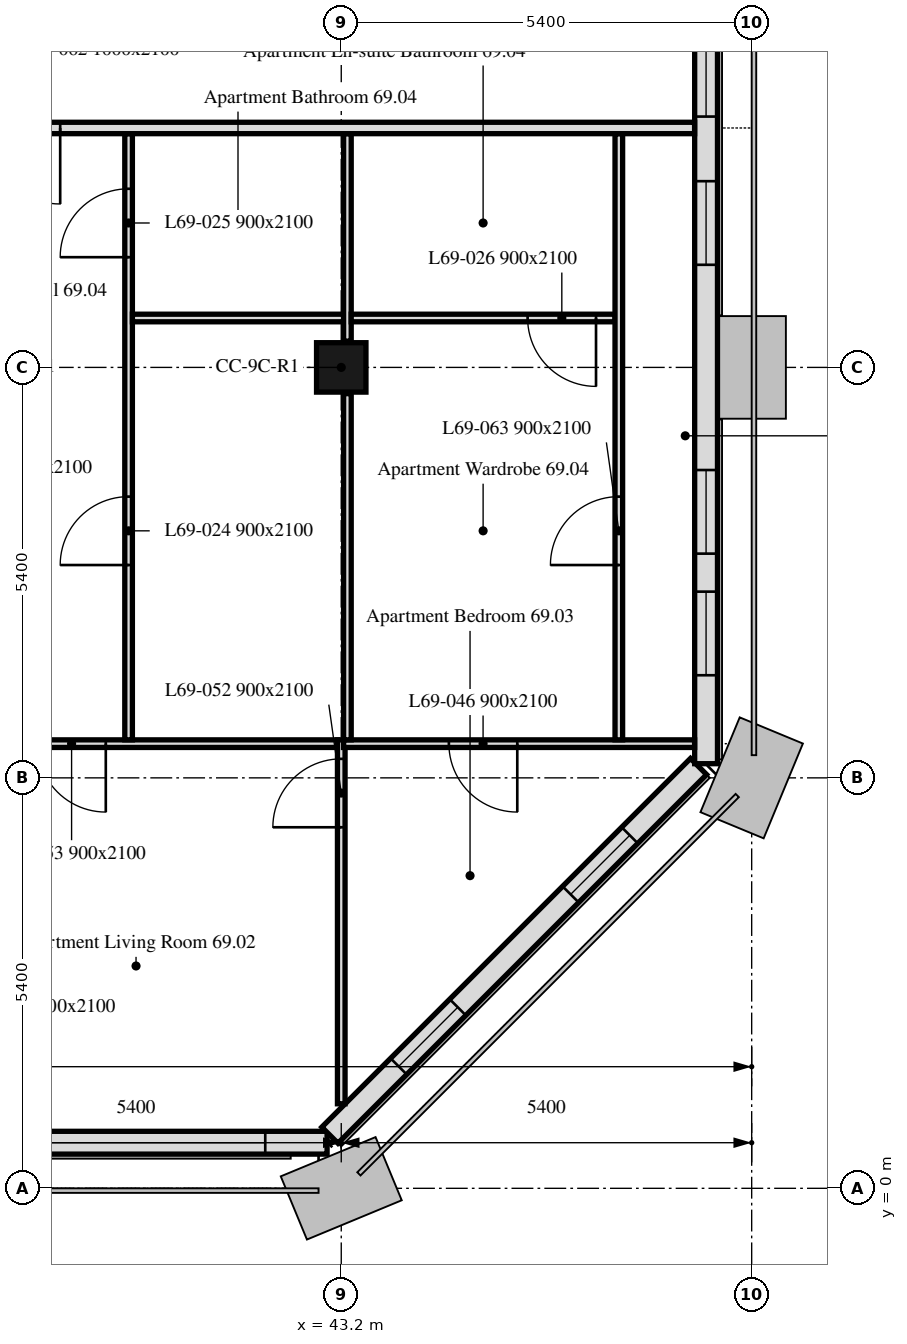
"""IFC4 building model, lengths in metres.
Left out: names, types, materials, properties, quantities, classifications, styles, units other than length and angle.
Written with IfcOpenShell. Run it as: python <this file> out.ifc"""

import sys

from ifc_helpers import new_model, si_unit, direction, frame, frame_2d, origin, origin_2d, place, context, subcontext, project, spatial, rectangle, extrude, element, fill, save


model = new_model("IFC4")
c1 = context("Model", 3, precision=1e-05, world=origin(), true_north=direction((0.0, 1.0)))
c2 = subcontext(c1, "Body", "Model", "MODEL_VIEW")
j1 = project(units=[si_unit("LENGTHUNIT", "METRE"), si_unit("PLANEANGLEUNIT", "RADIAN")], contexts=[c1])
p1 = place(None, origin())
s1 = spatial("IfcSite", under=j1, at=p1, CompositionType="ELEMENT")
p2 = place(p1, origin())
s2 = spatial("IfcBuilding", under=s1, at=p2, CompositionType="ELEMENT")
p3 = place(p2, frame((0.0, 0.0, 281.8)))
s3 = spatial("IfcBuildingStorey", under=s2, at=p3, CompositionType="ELEMENT", Elevation=281.8)
p4 = place(p3, frame((43.2, 10.8, 0.0), z_axis=(0.0, 0.0, 1.0), x_axis=(1.0, 0.0, 0.0)))
e1 = element("IfcColumn", 1, at=p4, inside=s3, PredefinedType="COLUMN", context=c2, shape_type="SweptSolid", body=[
    extrude(rectangle(XDim=0.65, YDim=0.65, at=origin_2d()), origin(), (0.0, 0.0, 1.0), 3.0),
])
p5 = place(p3, frame((10.986, 0.6, 0.0), z_axis=(0.0, 0.0, 1.0), x_axis=(1.0, 0.0, 0.0)))
e2 = element("IfcWall", 2, at=p5, inside=s3, PredefinedType="SOLIDWALL", context=c2, shape_type="SweptSolid", body=[
    extrude(rectangle(XDim=32.027, YDim=0.3, at=frame_2d((16.014, 0.0))), origin(), (0.0, 0.0, 1.0), 3.0),
])
p6 = place(p5, frame((2.764, 0.0, 0.9)))
e3 = element("IfcOpeningElement", 3, at=p6, cuts=e2, PredefinedType="OPENING", context=c2, shape_type="SweptSolid", body=[
    extrude(rectangle(XDim=1.1, YDim=1.7, at=frame_2d((0.55, 0.85))), frame((0.0, 0.16, 0.0), z_axis=(0.0, -1.0, 0.0), x_axis=(1.0, 0.0, 0.0)), (0.0, 0.0, 1.0), 0.32),
])
p7 = place(p5, frame((6.214, 0.0, 0.9)))
e4 = element("IfcOpeningElement", 4, at=p7, cuts=e2, PredefinedType="OPENING", context=c2, shape_type="SweptSolid", body=[
    extrude(rectangle(XDim=3.4, YDim=1.7, at=frame_2d((1.7, 0.85))), frame((0.0, 0.16, 0.0), z_axis=(0.0, -1.0, 0.0), x_axis=(1.0, 0.0, 0.0)), (0.0, 0.0, 1.0), 0.32),
])
p8 = place(p5, frame((13.564, 0.0, 0.9)))
e5 = element("IfcOpeningElement", 5, at=p8, cuts=e2, PredefinedType="OPENING", context=c2, shape_type="SweptSolid", body=[
    extrude(rectangle(XDim=1.1, YDim=1.7, at=frame_2d((0.55, 0.85))), frame((0.0, 0.16, 0.0), z_axis=(0.0, -1.0, 0.0), x_axis=(1.0, 0.0, 0.0)), (0.0, 0.0, 1.0), 0.32),
])
p9 = place(p5, frame((17.014, 0.0, 0.9)))
e6 = element("IfcOpeningElement", 6, at=p9, cuts=e2, PredefinedType="OPENING", context=c2, shape_type="SweptSolid", body=[
    extrude(rectangle(XDim=3.4, YDim=1.7, at=frame_2d((1.7, 0.85))), frame((0.0, 0.16, 0.0), z_axis=(0.0, -1.0, 0.0), x_axis=(1.0, 0.0, 0.0)), (0.0, 0.0, 1.0), 0.32),
])
p10 = place(p5, frame((24.364, 0.0, 0.9)))
e7 = element("IfcOpeningElement", 7, at=p10, cuts=e2, PredefinedType="OPENING", context=c2, shape_type="SweptSolid", body=[
    extrude(rectangle(XDim=1.1, YDim=1.7, at=frame_2d((0.55, 0.85))), frame((0.0, 0.16, 0.0), z_axis=(0.0, -1.0, 0.0), x_axis=(1.0, 0.0, 0.0)), (0.0, 0.0, 1.0), 0.32),
])
p11 = place(p5, frame((27.814, 0.0, 0.9)))
e8 = element("IfcOpeningElement", 8, at=p11, cuts=e2, PredefinedType="OPENING", context=c2, shape_type="SweptSolid", body=[
    extrude(rectangle(XDim=3.4, YDim=1.7, at=frame_2d((1.7, 0.85))), frame((0.0, 0.16, 0.0), z_axis=(0.0, -1.0, 0.0), x_axis=(1.0, 0.0, 0.0)), (0.0, 0.0, 1.0), 0.32),
])
p12 = place(p3, frame((43.051, 0.699, 0.0), z_axis=(0.0, 0.0, 1.0), x_axis=(0.707106781187, 0.707106781187, 0.0)))
e9 = element("IfcWall", 9, at=p12, inside=s3, PredefinedType="SOLIDWALL", context=c2, shape_type="SweptSolid", body=[
    extrude(rectangle(XDim=6.86, YDim=0.3, at=frame_2d((3.43, 0.0))), origin(), (0.0, 0.0, 1.0), 3.0),
])
p13 = place(p12, frame((1.28, 0.0, 0.9)))
e10 = element("IfcOpeningElement", 10, at=p13, cuts=e9, PredefinedType="OPENING", context=c2, shape_type="SweptSolid", body=[
    extrude(rectangle(XDim=1.1, YDim=1.7, at=frame_2d((0.55, 0.85))), frame((0.0, 0.16, 0.0), z_axis=(0.0, -1.0, 0.0), x_axis=(1.0, 0.0, 0.0)), (0.0, 0.0, 1.0), 0.32),
])
p14 = place(p12, frame((4.48, 0.0, 0.9)))
e11 = element("IfcOpeningElement", 11, at=p14, cuts=e9, PredefinedType="OPENING", context=c2, shape_type="SweptSolid", body=[
    extrude(rectangle(XDim=1.1, YDim=1.7, at=frame_2d((0.55, 0.85))), frame((0.0, 0.16, 0.0), z_axis=(0.0, -1.0, 0.0), x_axis=(1.0, 0.0, 0.0)), (0.0, 0.0, 1.0), 0.32),
])
p15 = place(p3, frame((48.0, 5.586, 0.0), z_axis=(0.0, 0.0, 1.0), x_axis=(0.0, 1.0, 0.0)))
e12 = element("IfcWall", 12, at=p15, inside=s3, PredefinedType="SOLIDWALL", context=c2, shape_type="SweptSolid", body=[
    extrude(rectangle(XDim=32.027, YDim=0.3, at=frame_2d((16.014, 0.0))), origin(), (0.0, 0.0, 1.0), 3.0),
])
p16 = place(p15, frame((1.164, 0.0, 0.9)))
e13 = element("IfcOpeningElement", 13, at=p16, cuts=e12, PredefinedType="OPENING", context=c2, shape_type="SweptSolid", body=[
    extrude(rectangle(XDim=1.1, YDim=1.7, at=frame_2d((0.55, 0.85))), frame((0.0, 0.16, 0.0), z_axis=(0.0, -1.0, 0.0), x_axis=(1.0, 0.0, 0.0)), (0.0, 0.0, 1.0), 0.32),
])
p17 = place(p15, frame((2.764, 0.0, 0.9)))
e14 = element("IfcOpeningElement", 14, at=p17, cuts=e12, PredefinedType="OPENING", context=c2, shape_type="SweptSolid", body=[
    extrude(rectangle(XDim=1.1, YDim=1.7, at=frame_2d((0.55, 0.85))), frame((0.0, 0.16, 0.0), z_axis=(0.0, -1.0, 0.0), x_axis=(1.0, 0.0, 0.0)), (0.0, 0.0, 1.0), 0.32),
])
p18 = place(p15, frame((6.564, 0.0, 0.9)))
e15 = element("IfcOpeningElement", 15, at=p18, cuts=e12, PredefinedType="OPENING", context=c2, shape_type="SweptSolid", body=[
    extrude(rectangle(XDim=1.1, YDim=1.7, at=frame_2d((0.55, 0.85))), frame((0.0, 0.16, 0.0), z_axis=(0.0, -1.0, 0.0), x_axis=(1.0, 0.0, 0.0)), (0.0, 0.0, 1.0), 0.32),
])
p19 = place(p15, frame((8.514, 0.0, 0.9)))
e16 = element("IfcOpeningElement", 16, at=p19, cuts=e12, PredefinedType="OPENING", context=c2, shape_type="SweptSolid", body=[
    extrude(rectangle(XDim=1.1, YDim=1.7, at=frame_2d((0.55, 0.85))), frame((0.0, 0.16, 0.0), z_axis=(0.0, -1.0, 0.0), x_axis=(1.0, 0.0, 0.0)), (0.0, 0.0, 1.0), 0.32),
])
p20 = place(p15, frame((11.964, 0.0, 0.9)))
e17 = element("IfcOpeningElement", 17, at=p20, cuts=e12, PredefinedType="OPENING", context=c2, shape_type="SweptSolid", body=[
    extrude(rectangle(XDim=1.1, YDim=1.7, at=frame_2d((0.55, 0.85))), frame((0.0, 0.16, 0.0), z_axis=(0.0, -1.0, 0.0), x_axis=(1.0, 0.0, 0.0)), (0.0, 0.0, 1.0), 0.32),
])
p21 = place(p15, frame((13.564, 0.0, 0.9)))
e18 = element("IfcOpeningElement", 18, at=p21, cuts=e12, PredefinedType="OPENING", context=c2, shape_type="SweptSolid", body=[
    extrude(rectangle(XDim=1.1, YDim=1.7, at=frame_2d((0.55, 0.85))), frame((0.0, 0.16, 0.0), z_axis=(0.0, -1.0, 0.0), x_axis=(1.0, 0.0, 0.0)), (0.0, 0.0, 1.0), 0.32),
])
p22 = place(p15, frame((17.014, 0.0, 0.9)))
e19 = element("IfcOpeningElement", 19, at=p22, cuts=e12, PredefinedType="OPENING", context=c2, shape_type="SweptSolid", body=[
    extrude(rectangle(XDim=3.4, YDim=1.7, at=frame_2d((1.7, 0.85))), frame((0.0, 0.16, 0.0), z_axis=(0.0, -1.0, 0.0), x_axis=(1.0, 0.0, 0.0)), (0.0, 0.0, 1.0), 0.32),
])
p23 = place(p15, frame((22.764, 0.0, 0.9)))
e20 = element("IfcOpeningElement", 20, at=p23, cuts=e12, PredefinedType="OPENING", context=c2, shape_type="SweptSolid", body=[
    extrude(rectangle(XDim=1.1, YDim=1.7, at=frame_2d((0.55, 0.85))), frame((0.0, 0.16, 0.0), z_axis=(0.0, -1.0, 0.0), x_axis=(1.0, 0.0, 0.0)), (0.0, 0.0, 1.0), 0.32),
])
p24 = place(p15, frame((24.364, 0.0, 0.9)))
e21 = element("IfcOpeningElement", 21, at=p24, cuts=e12, PredefinedType="OPENING", context=c2, shape_type="SweptSolid", body=[
    extrude(rectangle(XDim=1.1, YDim=1.7, at=frame_2d((0.55, 0.85))), frame((0.0, 0.16, 0.0), z_axis=(0.0, -1.0, 0.0), x_axis=(1.0, 0.0, 0.0)), (0.0, 0.0, 1.0), 0.32),
])
p25 = place(p15, frame((28.239, 0.0, 0.9)))
e22 = element("IfcOpeningElement", 22, at=p25, cuts=e12, PredefinedType="OPENING", context=c2, shape_type="SweptSolid", body=[
    extrude(rectangle(XDim=0.65, YDim=1.7, at=frame_2d((0.325, 0.85))), frame((0.0, 0.16, 0.0), z_axis=(0.0, -1.0, 0.0), x_axis=(1.0, 0.0, 0.0)), (0.0, 0.0, 1.0), 0.32),
])
p26 = place(p15, frame((29.764, 0.0, 0.9)))
e23 = element("IfcOpeningElement", 23, at=p26, cuts=e12, PredefinedType="OPENING", context=c2, shape_type="SweptSolid", body=[
    extrude(rectangle(XDim=1.1, YDim=1.7, at=frame_2d((0.55, 0.85))), frame((0.0, 0.16, 0.0), z_axis=(0.0, -1.0, 0.0), x_axis=(1.0, 0.0, 0.0)), (0.0, 0.0, 1.0), 0.32),
])
p27 = place(p3, frame((43.2, 1.112, 0.0), z_axis=(0.0, 0.0, 1.0), x_axis=(0.0, 1.0, 0.0)))
e24 = element("IfcWall", 24, at=p27, inside=s3, PredefinedType="PARTITIONING", context=c2, shape_type="SweptSolid", body=[
    extrude(rectangle(XDim=4.788, YDim=0.1, at=frame_2d((2.394, 0.0))), origin(), (0.0, 0.0, 1.0), 3.0),
])
p28 = place(p27, frame((3.638, 0.0, 0.0)))
e25 = element("IfcOpeningElement", 25, at=p28, cuts=e24, PredefinedType="OPENING", context=c2, shape_type="SweptSolid", body=[
    extrude(rectangle(XDim=0.9, YDim=2.1, at=frame_2d((0.45, 1.05))), frame((0.0, 0.05, 0.0), z_axis=(0.0, -1.0, 0.0), x_axis=(1.0, 0.0, 0.0)), (0.0, 0.0, 1.0), 0.1),
])
p29 = place(p3, frame((43.15, 5.85, 0.0), z_axis=(0.0, 0.0, 1.0), x_axis=(-1.0, 0.0, 0.0)))
e26 = element("IfcWall", 26, at=p29, inside=s3, PredefinedType="PARTITIONING", context=c2, shape_type="SweptSolid", body=[
    extrude(rectangle(XDim=5.35, YDim=0.1, at=frame_2d((2.675, 0.0))), origin(), (0.0, 0.0, 1.0), 3.0),
])
p30 = place(p29, frame((3.048, 0.0, 0.0)))
e27 = element("IfcOpeningElement", 27, at=p30, cuts=e26, PredefinedType="OPENING", context=c2, shape_type="SweptSolid", body=[
    extrude(rectangle(XDim=0.9, YDim=2.1, at=frame_2d((0.45, 1.05))), frame((0.0, 0.05, 0.0), z_axis=(0.0, -1.0, 0.0), x_axis=(1.0, 0.0, 0.0)), (0.0, 0.0, 1.0), 0.1),
])
p31 = place(p3, frame((47.849, 5.85, 0.0), z_axis=(0.0, 0.0, 1.0), x_axis=(-1.0, 0.0, 0.0)))
e28 = element("IfcWall", 28, at=p31, inside=s3, PredefinedType="PARTITIONING", context=c2, shape_type="SweptSolid", body=[
    extrude(rectangle(XDim=4.618, YDim=0.1, at=frame_2d((2.309, 0.0))), origin(), (0.0, 0.0, 1.0), 3.0),
])
p32 = place(p31, frame((2.333, 0.0, 0.0)))
e29 = element("IfcOpeningElement", 29, at=p32, cuts=e28, PredefinedType="OPENING", context=c2, shape_type="SweptSolid", body=[
    extrude(rectangle(XDim=0.9, YDim=2.1, at=frame_2d((0.45, 1.05))), frame((0.0, 0.05, 0.0), z_axis=(0.0, -1.0, 0.0), x_axis=(1.0, 0.0, 0.0)), (0.0, 0.0, 1.0), 0.1),
])
p33 = place(p3, frame((40.402, 5.9, 0.0), z_axis=(0.0, 0.0, 1.0), x_axis=(0.0, 1.0, 0.0)))
e30 = element("IfcWall", 30, at=p33, inside=s3, PredefinedType="PARTITIONING", context=c2, shape_type="SweptSolid", body=[
    extrude(rectangle(XDim=7.975, YDim=0.1, at=frame_2d((3.988, 0.0))), origin(), (0.0, 0.0, 1.0), 2.4),
])
p34 = place(p33, frame((2.3, 0.0, 0.0)))
e31 = element("IfcOpeningElement", 31, at=p34, cuts=e30, PredefinedType="OPENING", context=c2, shape_type="SweptSolid", body=[
    extrude(rectangle(XDim=0.9, YDim=2.1, at=frame_2d((0.45, 1.05))), frame((0.0, 0.05, 0.0), z_axis=(0.0, -1.0, 0.0), x_axis=(1.0, 0.0, 0.0)), (0.0, 0.0, 1.0), 0.1),
])
p35 = place(p33, frame((6.35, 0.0, 0.0)))
e32 = element("IfcOpeningElement", 32, at=p35, cuts=e30, PredefinedType="OPENING", context=c2, shape_type="SweptSolid", body=[
    extrude(rectangle(XDim=0.9, YDim=2.1, at=frame_2d((0.45, 1.05))), frame((0.0, 0.05, 0.0), z_axis=(0.0, -1.0, 0.0), x_axis=(1.0, 0.0, 0.0)), (0.0, 0.0, 1.0), 0.1),
])
p36 = place(p3, frame((43.281, 5.9, 0.0), z_axis=(0.0, 0.0, 1.0), x_axis=(0.0, 1.0, 0.0)))
e33 = element("IfcWall", 33, at=p36, inside=s3, PredefinedType="PARTITIONING", context=c2, shape_type="SweptSolid", body=[
    extrude(rectangle(XDim=4.555, YDim=0.1, at=frame_2d((2.278, 0.0))), origin(), (0.0, 0.0, 1.0), 3.0),
])
p37 = place(p3, frame((43.231, 11.45, 0.0), z_axis=(0.0, 0.0, 1.0), x_axis=(-1.0, 0.0, 0.0)))
e34 = element("IfcWall", 34, at=p37, inside=s3, PredefinedType="PARTITIONING", context=c2, shape_type="SweptSolid", body=[
    extrude(rectangle(XDim=2.779, YDim=0.1, at=frame_2d((1.39, 0.0))), origin(), (0.0, 0.0, 1.0), 3.0),
])
p38 = place(p3, frame((43.281, 11.145, 0.0), z_axis=(0.0, 0.0, 1.0), x_axis=(0.0, 1.0, 0.0)))
e35 = element("IfcWall", 35, at=p38, inside=s3, PredefinedType="PARTITIONING", context=c2, shape_type="SweptSolid", body=[
    extrude(rectangle(XDim=2.73, YDim=0.1, at=frame_2d((1.365, 0.0))), origin(), (0.0, 0.0, 1.0), 3.0),
])
p39 = place(p3, frame((46.802, 11.45, 0.0), z_axis=(0.0, 0.0, 1.0), x_axis=(-1.0, 0.0, 0.0)))
e36 = element("IfcWall", 36, at=p39, inside=s3, PredefinedType="PARTITIONING", context=c2, shape_type="SweptSolid", body=[
    extrude(rectangle(XDim=3.471, YDim=0.1, at=frame_2d((1.735, 0.0))), origin(), (0.0, 0.0, 1.0), 3.0),
])
p40 = place(p39, frame((0.25, 0.0, 0.0)))
e37 = element("IfcOpeningElement", 37, at=p40, cuts=e36, PredefinedType="OPENING", context=c2, shape_type="SweptSolid", body=[
    extrude(rectangle(XDim=0.9, YDim=2.1, at=frame_2d((0.45, 1.05))), frame((0.0, 0.05, 0.0), z_axis=(0.0, -1.0, 0.0), x_axis=(1.0, 0.0, 0.0)), (0.0, 0.0, 1.0), 0.1),
])
p41 = place(p3, frame((46.852, 5.9, 0.0), z_axis=(0.0, 0.0, 1.0), x_axis=(0.0, 1.0, 0.0)))
e38 = element("IfcWall", 38, at=p41, inside=s3, PredefinedType="PARTITIONING", context=c2, shape_type="SweptSolid", body=[
    extrude(rectangle(XDim=7.975, YDim=0.1, at=frame_2d((3.988, 0.0))), origin(), (0.0, 0.0, 1.0), 2.4),
])
p42 = place(p41, frame((2.3, 0.0, 0.0)))
e39 = element("IfcOpeningElement", 39, at=p42, cuts=e38, PredefinedType="OPENING", context=c2, shape_type="SweptSolid", body=[
    extrude(rectangle(XDim=0.9, YDim=2.1, at=frame_2d((0.45, 1.05))), frame((0.0, 0.05, 0.0), z_axis=(0.0, -1.0, 0.0), x_axis=(1.0, 0.0, 0.0)), (0.0, 0.0, 1.0), 0.1),
])
p43 = place(p3, frame((47.849, 13.95, 0.0), z_axis=(0.0, 0.0, 1.0), x_axis=(-1.0, 0.0, 0.0)))
e40 = element("IfcWall", 40, at=p43, inside=s3, PredefinedType="PARTITIONING", context=c2, shape_type="SweptSolid", body=[
    extrude(rectangle(XDim=41.698, YDim=0.15, at=frame_2d((20.849, 0.0))), origin(), (0.0, 0.0, 1.0), 2.4),
])
p44 = place(p43, frame((37.749, 0.0, 0.0)))
e41 = element("IfcOpeningElement", 41, at=p44, cuts=e40, PredefinedType="OPENING", context=c2, shape_type="SweptSolid", body=[
    extrude(rectangle(XDim=1.0, YDim=2.1, at=frame_2d((0.5, 1.05))), frame((0.0, 0.075, 0.0), z_axis=(0.0, -1.0, 0.0), x_axis=(1.0, 0.0, 0.0)), (0.0, 0.0, 1.0), 0.15),
])
p45 = place(p43, frame((32.244, 0.0, 0.0)))
e42 = element("IfcOpeningElement", 42, at=p45, cuts=e40, PredefinedType="OPENING", context=c2, shape_type="SweptSolid", body=[
    extrude(rectangle(XDim=1.0, YDim=2.1, at=frame_2d((0.5, 1.05))), frame((0.0, 0.075, 0.0), z_axis=(0.0, -1.0, 0.0), x_axis=(1.0, 0.0, 0.0)), (0.0, 0.0, 1.0), 0.15),
])
p46 = place(p43, frame((27.735, 0.0, 0.0)))
e43 = element("IfcOpeningElement", 43, at=p46, cuts=e40, PredefinedType="OPENING", context=c2, shape_type="SweptSolid", body=[
    extrude(rectangle(XDim=1.0, YDim=2.1, at=frame_2d((0.5, 1.05))), frame((0.0, 0.075, 0.0), z_axis=(0.0, -1.0, 0.0), x_axis=(1.0, 0.0, 0.0)), (0.0, 0.0, 1.0), 0.15),
])
p47 = place(p43, frame((8.347, 0.0, 0.0)))
e44 = element("IfcOpeningElement", 44, at=p47, cuts=e40, PredefinedType="OPENING", context=c2, shape_type="SweptSolid", body=[
    extrude(rectangle(XDim=1.0, YDim=2.1, at=frame_2d((0.5, 1.05))), frame((0.0, 0.075, 0.0), z_axis=(0.0, -1.0, 0.0), x_axis=(1.0, 0.0, 0.0)), (0.0, 0.0, 1.0), 0.15),
])
p48 = place(p11, origin())
e45 = element("IfcWindow", 45, at=p48, inside=s3, PartitioningType="SINGLE_PANEL", PredefinedType="WINDOW", context=c2, shape_type="SweptSolid", body=[
    extrude(rectangle(XDim=3.4, YDim=1.7, at=frame_2d((1.7, 0.85))), frame((0.0, 0.03, 0.0), z_axis=(0.0, -1.0, 0.0), x_axis=(1.0, 0.0, 0.0)), (0.0, 0.0, 1.0), 0.06),
])
fill(e8, e45)
p49 = place(p13, origin())
e46 = element("IfcWindow", 46, at=p49, inside=s3, PartitioningType="SINGLE_PANEL", PredefinedType="WINDOW", context=c2, shape_type="SweptSolid", body=[
    extrude(rectangle(XDim=1.1, YDim=1.7, at=frame_2d((0.55, 0.85))), frame((0.0, 0.03, 0.0), z_axis=(0.0, -1.0, 0.0), x_axis=(1.0, 0.0, 0.0)), (0.0, 0.0, 1.0), 0.06),
])
fill(e10, e46)
p50 = place(p14, origin())
e47 = element("IfcWindow", 47, at=p50, inside=s3, PartitioningType="SINGLE_PANEL", PredefinedType="WINDOW", context=c2, shape_type="SweptSolid", body=[
    extrude(rectangle(XDim=1.1, YDim=1.7, at=frame_2d((0.55, 0.85))), frame((0.0, 0.03, 0.0), z_axis=(0.0, -1.0, 0.0), x_axis=(1.0, 0.0, 0.0)), (0.0, 0.0, 1.0), 0.06),
])
fill(e11, e47)
p51 = place(p16, origin())
e48 = element("IfcWindow", 48, at=p51, inside=s3, PartitioningType="SINGLE_PANEL", PredefinedType="WINDOW", context=c2, shape_type="SweptSolid", body=[
    extrude(rectangle(XDim=1.1, YDim=1.7, at=frame_2d((0.55, 0.85))), frame((0.0, 0.03, 0.0), z_axis=(0.0, -1.0, 0.0), x_axis=(1.0, 0.0, 0.0)), (0.0, 0.0, 1.0), 0.06),
])
fill(e13, e48)
p52 = place(p17, origin())
e49 = element("IfcWindow", 49, at=p52, inside=s3, PartitioningType="SINGLE_PANEL", PredefinedType="WINDOW", context=c2, shape_type="SweptSolid", body=[
    extrude(rectangle(XDim=1.1, YDim=1.7, at=frame_2d((0.55, 0.85))), frame((0.0, 0.03, 0.0), z_axis=(0.0, -1.0, 0.0), x_axis=(1.0, 0.0, 0.0)), (0.0, 0.0, 1.0), 0.06),
])
fill(e14, e49)
p53 = place(p18, origin())
e50 = element("IfcWindow", 50, at=p53, inside=s3, PartitioningType="SINGLE_PANEL", PredefinedType="WINDOW", context=c2, shape_type="SweptSolid", body=[
    extrude(rectangle(XDim=1.1, YDim=1.7, at=frame_2d((0.55, 0.85))), frame((0.0, 0.03, 0.0), z_axis=(0.0, -1.0, 0.0), x_axis=(1.0, 0.0, 0.0)), (0.0, 0.0, 1.0), 0.06),
])
fill(e15, e50)
p54 = place(p19, origin())
e51 = element("IfcWindow", 51, at=p54, inside=s3, PartitioningType="SINGLE_PANEL", PredefinedType="WINDOW", context=c2, shape_type="SweptSolid", body=[
    extrude(rectangle(XDim=1.1, YDim=1.7, at=frame_2d((0.55, 0.85))), frame((0.0, 0.03, 0.0), z_axis=(0.0, -1.0, 0.0), x_axis=(1.0, 0.0, 0.0)), (0.0, 0.0, 1.0), 0.06),
])
fill(e16, e51)
p55 = place(p34, origin())
e52 = element("IfcDoor", 52, at=p55, inside=s3, OperationType="SINGLE_SWING_LEFT", PredefinedType="DOOR", context=c2, shape_type="SweptSolid", body=[
    extrude(rectangle(XDim=0.9, YDim=2.1, at=frame_2d((0.45, 1.05))), frame((0.0, 0.025, 0.0), z_axis=(0.0, -1.0, 0.0), x_axis=(1.0, 0.0, 0.0)), (0.0, 0.0, 1.0), 0.05),
])
fill(e31, e52)
p56 = place(p35, origin())
e53 = element("IfcDoor", 53, at=p56, inside=s3, OperationType="SINGLE_SWING_LEFT", PredefinedType="DOOR", context=c2, shape_type="SweptSolid", body=[
    extrude(rectangle(XDim=0.9, YDim=2.1, at=frame_2d((0.45, 1.05))), frame((0.0, 0.025, 0.0), z_axis=(0.0, -1.0, 0.0), x_axis=(1.0, 0.0, 0.0)), (0.0, 0.0, 1.0), 0.05),
])
fill(e32, e53)
p57 = place(p40, origin())
e54 = element("IfcDoor", 54, at=p57, inside=s3, OperationType="SINGLE_SWING_LEFT", PredefinedType="DOOR", context=c2, shape_type="SweptSolid", body=[
    extrude(rectangle(XDim=0.9, YDim=2.1, at=frame_2d((0.45, 1.05))), frame((0.0, 0.025, 0.0), z_axis=(0.0, -1.0, 0.0), x_axis=(1.0, 0.0, 0.0)), (0.0, 0.0, 1.0), 0.05),
])
fill(e37, e54)
p58 = place(p32, origin())
e55 = element("IfcDoor", 55, at=p58, inside=s3, OperationType="SINGLE_SWING_LEFT", PredefinedType="DOOR", context=c2, shape_type="SweptSolid", body=[
    extrude(rectangle(XDim=0.9, YDim=2.1, at=frame_2d((0.45, 1.05))), frame((0.0, 0.025, 0.0), z_axis=(0.0, -1.0, 0.0), x_axis=(1.0, 0.0, 0.0)), (0.0, 0.0, 1.0), 0.05),
])
fill(e29, e55)
p59 = place(p28, origin())
e56 = element("IfcDoor", 56, at=p59, inside=s3, OperationType="SINGLE_SWING_LEFT", PredefinedType="DOOR", context=c2, shape_type="SweptSolid", body=[
    extrude(rectangle(XDim=0.9, YDim=2.1, at=frame_2d((0.45, 1.05))), frame((0.0, 0.025, 0.0), z_axis=(0.0, -1.0, 0.0), x_axis=(1.0, 0.0, 0.0)), (0.0, 0.0, 1.0), 0.05),
])
fill(e25, e56)
p60 = place(p30, origin())
e57 = element("IfcDoor", 57, at=p60, inside=s3, OperationType="SINGLE_SWING_RIGHT", PredefinedType="DOOR", context=c2, shape_type="SweptSolid", body=[
    extrude(rectangle(XDim=0.9, YDim=2.1, at=frame_2d((0.45, 1.05))), frame((0.0, 0.025, 0.0), z_axis=(0.0, -1.0, 0.0), x_axis=(1.0, 0.0, 0.0)), (0.0, 0.0, 1.0), 0.05),
])
fill(e27, e57)
p61 = place(p47, origin())
e58 = element("IfcDoor", 58, at=p61, inside=s3, OperationType="SINGLE_SWING_LEFT", PredefinedType="DOOR", context=c2, shape_type="SweptSolid", body=[
    extrude(rectangle(XDim=1.0, YDim=2.1, at=frame_2d((0.5, 1.05))), frame((0.0, 0.025, 0.0), z_axis=(0.0, -1.0, 0.0), x_axis=(1.0, 0.0, 0.0)), (0.0, 0.0, 1.0), 0.05),
])
fill(e44, e58)
p62 = place(p42, origin())
e59 = element("IfcDoor", 59, at=p62, inside=s3, OperationType="SINGLE_SWING_RIGHT", PredefinedType="DOOR", context=c2, shape_type="SweptSolid", body=[
    extrude(rectangle(XDim=0.9, YDim=2.1, at=frame_2d((0.45, 1.05))), frame((0.0, 0.025, 0.0), z_axis=(0.0, -1.0, 0.0), x_axis=(1.0, 0.0, 0.0)), (0.0, 0.0, 1.0), 0.05),
])
fill(e39, e59)
save(model, sys.argv[1])
